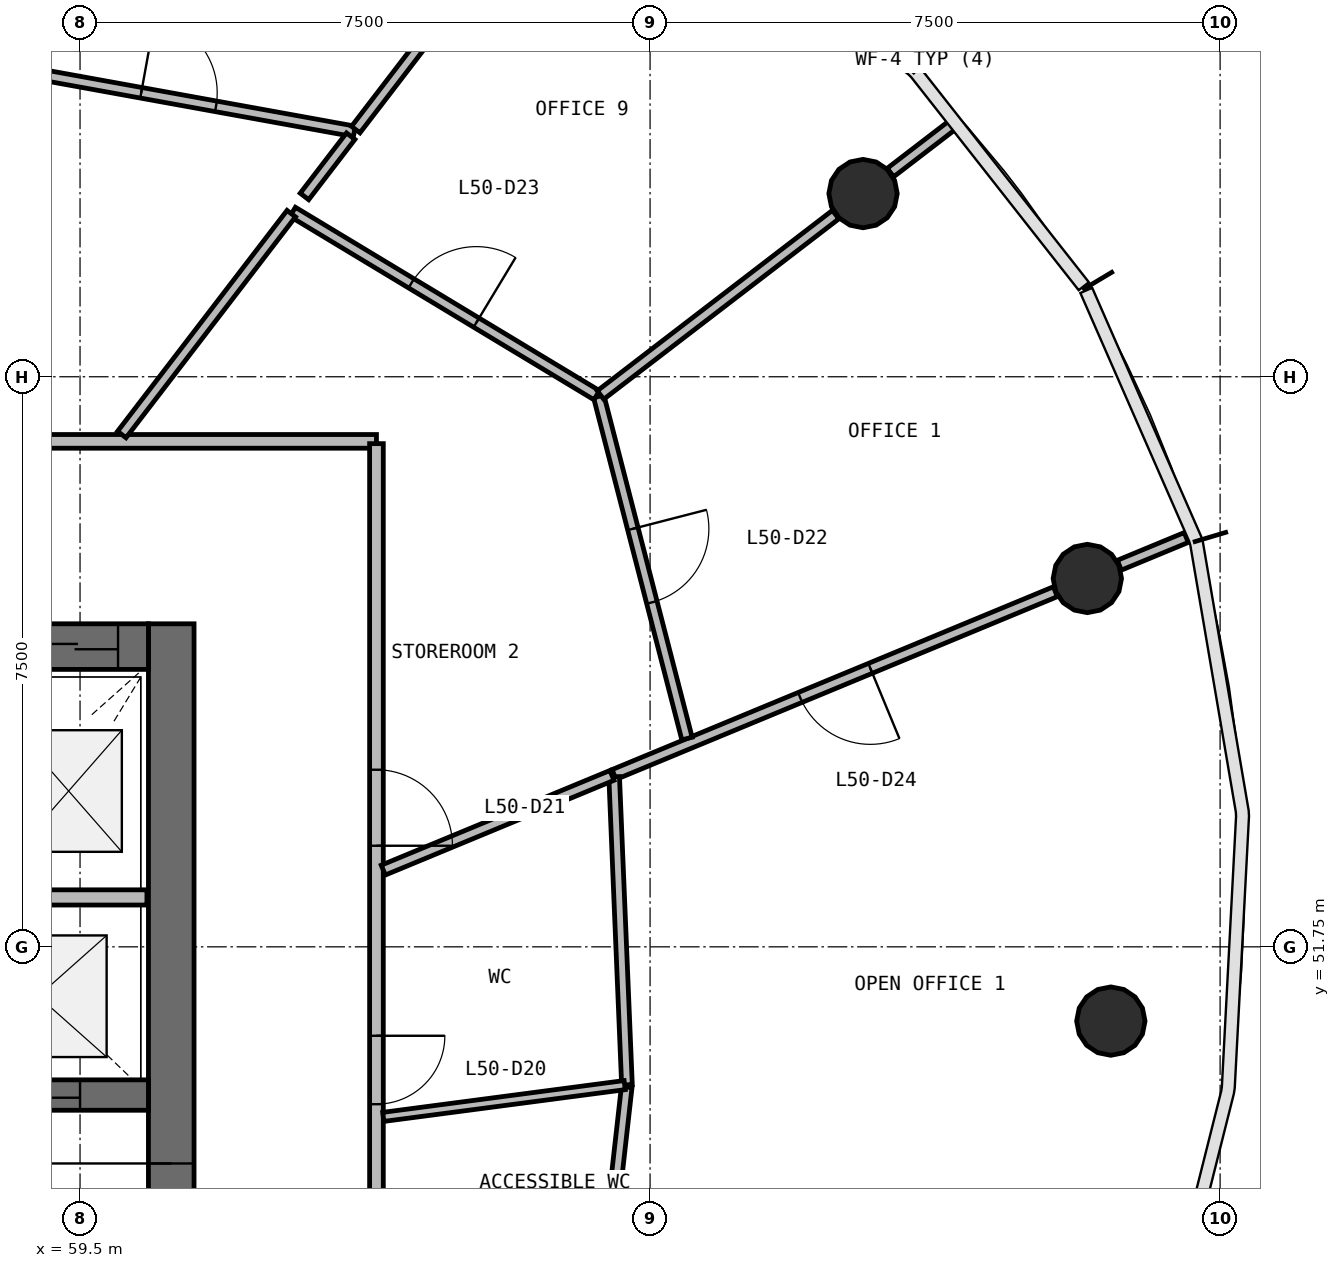
"""IFC4 building model, lengths in metres.
Left out: names, types, materials, properties, quantities, classifications, styles, units other than length and angle.
Written with IfcOpenShell. Run it as: python <this file> out.ifc"""

import sys

from ifc_helpers import new_model, si_unit, direction, frame, frame_2d, origin, origin_2d, place, context, subcontext, project, spatial, rectangle, circle, extrude, source, transform, mapped, element, fill, save


model = new_model("IFC4")
c1 = context("Model", 3, precision=1e-05, world=origin(), true_north=direction((0.0, 1.0)))
c2 = subcontext(c1, "Body", "Model", "MODEL_VIEW")
j1 = project(units=[si_unit("LENGTHUNIT", "METRE"), si_unit("PLANEANGLEUNIT", "RADIAN")], contexts=[c1])
p1 = place(None, origin())
s1 = spatial("IfcSite", under=j1, at=p1, CompositionType="ELEMENT")
p2 = place(p1, origin())
s2 = spatial("IfcBuilding", under=s1, at=p2, CompositionType="ELEMENT")
p3 = place(p2, frame((0.0, 0.0, 207.2)))
s3 = spatial("IfcBuildingStorey", under=s2, at=p3, CompositionType="ELEMENT", Elevation=207.2)
p4 = place(p3, frame((60.7, 40.0, 0.0), z_axis=(0.0, 0.0, 1.0), x_axis=(0.0, 1.0, 0.0)))
e1 = element("IfcWall", 1, at=p4, inside=s3, PredefinedType="SHEAR", context=c2, shape_type="SweptSolid", body=[
    extrude(rectangle(XDim=16.0, YDim=0.6, at=frame_2d((8.0, 0.0))), origin(), (0.0, 0.0, 1.0), 3.9),
])
p5 = place(p4, frame((7.1, 0.0, 0.0)))
e2 = element("IfcOpeningElement", 2, at=p5, cuts=e1, PredefinedType="OPENING", context=c2, shape_type="SweptSolid", body=[
    extrude(rectangle(XDim=1.8, YDim=2.1, at=frame_2d((0.9, 1.05))), frame((0.0, 0.31, 0.0), z_axis=(0.0, -1.0, 0.0), x_axis=(1.0, 0.0, 0.0)), (0.0, 0.0, 1.0), 0.62),
])
p6 = place(p3, frame((60.4, 55.7, 0.0), z_axis=(0.0, 0.0, 1.0), x_axis=(-1.0, 0.0, 0.0)))
e3 = element("IfcWall", 3, at=p6, inside=s3, PredefinedType="SHEAR", context=c2, shape_type="SweptSolid", body=[
    extrude(rectangle(XDim=16.8, YDim=0.6, at=frame_2d((8.4, 0.0))), origin(), (0.0, 0.0, 1.0), 3.9),
])
p7 = place(p6, frame((0.4, 0.0, 0.0)))
e4 = element("IfcOpeningElement", 4, at=p7, cuts=e3, PredefinedType="OPENING", context=c2, shape_type="SweptSolid", body=[
    extrude(rectangle(XDim=1.1, YDim=2.1, at=frame_2d((0.55, 1.05))), frame((0.0, 0.31, 0.0), z_axis=(0.0, -1.0, 0.0), x_axis=(1.0, 0.0, 0.0)), (0.0, 0.0, 1.0), 0.62),
])
p8 = place(p6, frame((10.3, 0.0, 0.0)))
e5 = element("IfcOpeningElement", 5, at=p8, cuts=e3, PredefinedType="OPENING", context=c2, shape_type="SweptSolid", body=[
    extrude(rectangle(XDim=1.2, YDim=2.1, at=frame_2d((0.6, 1.05))), frame((0.0, 0.31, 0.0), z_axis=(0.0, -1.0, 0.0), x_axis=(1.0, 0.0, 0.0)), (0.0, 0.0, 1.0), 0.62),
])
p9 = place(p6, frame((7.25, 0.0, 0.0)))
e6 = element("IfcOpeningElement", 6, at=p9, cuts=e3, PredefinedType="OPENING", context=c2, shape_type="SweptSolid", body=[
    extrude(rectangle(XDim=1.1, YDim=2.1, at=frame_2d((0.55, 1.05))), frame((0.0, 0.31, 0.0), z_axis=(0.0, -1.0, 0.0), x_axis=(1.0, 0.0, 0.0)), (0.0, 0.0, 1.0), 0.62),
])
p10 = place(p3, frame((43.6, 49.8, 0.0), z_axis=(0.0, 0.0, 1.0), x_axis=(1.0, 0.0, 0.0)))
e7 = element("IfcWall", 7, at=p10, inside=s3, PredefinedType="SHEAR", context=c2, shape_type="SweptSolid", body=[
    extrude(rectangle(XDim=16.8, YDim=0.4, at=frame_2d((8.4, 0.0))), origin(), (0.0, 0.0, 1.0), 3.9),
])
p11 = place(p10, frame((9.8, 0.0, 0.0)))
e8 = element("IfcOpeningElement", 8, at=p11, cuts=e7, PredefinedType="OPENING", context=c2, shape_type="SweptSolid", body=[
    extrude(rectangle(XDim=1.1, YDim=2.1, at=frame_2d((0.55, 1.05))), frame((0.0, 0.21, 0.0), z_axis=(0.0, -1.0, 0.0), x_axis=(1.0, 0.0, 0.0)), (0.0, 0.0, 1.0), 0.42),
])
p12 = place(p10, frame((12.3, 0.0, 0.0)))
e9 = element("IfcOpeningElement", 9, at=p12, cuts=e7, PredefinedType="OPENING", context=c2, shape_type="SweptSolid", body=[
    extrude(rectangle(XDim=1.1, YDim=2.1, at=frame_2d((0.55, 1.05))), frame((0.0, 0.21, 0.0), z_axis=(0.0, -1.0, 0.0), x_axis=(1.0, 0.0, 0.0)), (0.0, 0.0, 1.0), 0.42),
])
p13 = place(p10, frame((14.8, 0.0, 0.0)))
e10 = element("IfcOpeningElement", 10, at=p13, cuts=e7, PredefinedType="OPENING", context=c2, shape_type="SweptSolid", body=[
    extrude(rectangle(XDim=1.1, YDim=2.1, at=frame_2d((0.55, 1.05))), frame((0.0, 0.21, 0.0), z_axis=(0.0, -1.0, 0.0), x_axis=(1.0, 0.0, 0.0)), (0.0, 0.0, 1.0), 0.42),
])
p14 = place(p10, frame((3.45, 0.0, 0.0)))
e11 = element("IfcOpeningElement", 11, at=p14, cuts=e7, PredefinedType="OPENING", context=c2, shape_type="SweptSolid", body=[
    extrude(rectangle(XDim=0.9, YDim=2.1, at=frame_2d((0.45, 1.05))), frame((0.0, 0.21, 0.0), z_axis=(0.0, -1.0, 0.0), x_axis=(1.0, 0.0, 0.0)), (0.0, 0.0, 1.0), 0.42),
])
p15 = place(p10, frame((7.85, 0.0, 0.0)))
e12 = element("IfcOpeningElement", 12, at=p15, cuts=e7, PredefinedType="OPENING", context=c2, shape_type="SweptSolid", body=[
    extrude(rectangle(XDim=0.9, YDim=2.1, at=frame_2d((0.45, 1.05))), frame((0.0, 0.21, 0.0), z_axis=(0.0, -1.0, 0.0), x_axis=(1.0, 0.0, 0.0)), (0.0, 0.0, 1.0), 0.42),
])
m1 = source(origin(), c2, "Body", "SweptSolid", [
    extrude(circle(Radius=0.45, at=origin_2d()), origin(), (0.0, 0.0, 1.0), 3.9),
])
for number, where, z_axis, x_axis in (
    (13, (73.062, 50.773, 0.0), (0.0, 0.0, 1.0), (1.0, 0.0, 0.0)),
    (14, (72.753, 56.596, 0.0), (0.0, 0.0, 1.0), (1.0, 0.0, 0.0)),
    (15, (69.802, 61.66, 0.0), (0.0, 0.0, 1.0), (1.0, 0.0, 0.0)),
):
    element("IfcColumn", number, at=place(p3, frame(where, z_axis=z_axis, x_axis=x_axis)), inside=s3, PredefinedType="COLUMN", context=c2, shape_type="MappedRepresentation", body=[
        mapped(m1, transform((0.0, 0.0, 0.0), scale=1.0)),
    ])
p16 = place(p3, frame((60.38, 52.4, 0.0), z_axis=(0.0, 0.0, 1.0), x_axis=(-1.0, 0.0, 0.0)))
e16 = element("IfcWall", 16, at=p16, inside=s3, PredefinedType="SOLIDWALL", context=c2, shape_type="SweptSolid", body=[
    extrude(rectangle(XDim=1.85, YDim=0.2, at=frame_2d((0.925, 0.0))), origin(), (0.0, 0.0, 1.0), 3.58),
])
p17 = place(p3, frame((40.6, 58.4, 0.0), z_axis=(0.0, 0.0, 1.0), x_axis=(1.0, 0.0, 0.0)))
e17 = element("IfcWall", 17, at=p17, inside=s3, PredefinedType="PARTITIONING", context=c2, shape_type="SweptSolid", body=[
    extrude(rectangle(XDim=22.8, YDim=0.18, at=frame_2d((11.4, 0.0))), origin(), (0.0, 0.0, 1.0), 2.88),
])
p18 = place(p17, frame((12.95, 0.0, 0.0)))
e18 = element("IfcOpeningElement", 18, at=p18, cuts=e17, PredefinedType="OPENING", context=c2, shape_type="SweptSolid", body=[
    extrude(rectangle(XDim=1.0, YDim=2.1, at=frame_2d((0.5, 1.05))), frame((0.0, 0.1, 0.0), z_axis=(0.0, -1.0, 0.0), x_axis=(1.0, 0.0, 0.0)), (0.0, 0.0, 1.0), 0.2),
])
p19 = place(p17, frame((10.95, 0.0, 0.0)))
e19 = element("IfcOpeningElement", 19, at=p19, cuts=e17, PredefinedType="OPENING", context=c2, shape_type="SweptSolid", body=[
    extrude(rectangle(XDim=1.0, YDim=2.1, at=frame_2d((0.5, 1.05))), frame((0.0, 0.1, 0.0), z_axis=(0.0, -1.0, 0.0), x_axis=(1.0, 0.0, 0.0)), (0.0, 0.0, 1.0), 0.2),
])
p20 = place(p3, frame((63.4, 58.37, 0.0), z_axis=(0.0, 0.0, 1.0), x_axis=(0.0, -1.0, 0.0)))
e20 = element("IfcWall", 20, at=p20, inside=s3, PredefinedType="PARTITIONING", context=c2, shape_type="SweptSolid", body=[
    extrude(rectangle(XDim=20.74, YDim=0.18, at=frame_2d((10.37, 0.0))), origin(), (0.0, 0.0, 1.0), 2.88),
])
p21 = place(p20, frame((9.99, 0.0, 0.0)))
e21 = element("IfcOpeningElement", 21, at=p21, cuts=e20, PredefinedType="OPENING", context=c2, shape_type="SweptSolid", body=[
    extrude(rectangle(XDim=0.9, YDim=2.1, at=frame_2d((0.45, 1.05))), frame((0.0, 0.1, 0.0), z_axis=(0.0, -1.0, 0.0), x_axis=(1.0, 0.0, 0.0)), (0.0, 0.0, 1.0), 0.2),
])
p22 = place(p20, frame((7.79, 0.0, 0.0)))
e22 = element("IfcOpeningElement", 22, at=p22, cuts=e20, PredefinedType="OPENING", context=c2, shape_type="SweptSolid", body=[
    extrude(rectangle(XDim=0.9, YDim=2.1, at=frame_2d((0.45, 1.05))), frame((0.0, 0.1, 0.0), z_axis=(0.0, -1.0, 0.0), x_axis=(1.0, 0.0, 0.0)), (0.0, 0.0, 1.0), 0.2),
])
p23 = place(p20, frame((4.29, 0.0, 0.0)))
e23 = element("IfcOpeningElement", 23, at=p23, cuts=e20, PredefinedType="OPENING", context=c2, shape_type="SweptSolid", body=[
    extrude(rectangle(XDim=1.0, YDim=2.1, at=frame_2d((0.5, 1.05))), frame((0.0, 0.1, 0.0), z_axis=(0.0, -1.0, 0.0), x_axis=(1.0, 0.0, 0.0)), (0.0, 0.0, 1.0), 0.2),
])
p24 = place(p20, frame((15.49, 0.0, 0.0)))
e24 = element("IfcOpeningElement", 24, at=p24, cuts=e20, PredefinedType="OPENING", context=c2, shape_type="SweptSolid", body=[
    extrude(rectangle(XDim=1.0, YDim=2.1, at=frame_2d((0.5, 1.05))), frame((0.0, 0.1, 0.0), z_axis=(0.0, -1.0, 0.0), x_axis=(1.0, 0.0, 0.0)), (0.0, 0.0, 1.0), 0.2),
])
p25 = place(p20, frame((12.09, 0.0, 0.0)))
e25 = element("IfcOpeningElement", 25, at=p25, cuts=e20, PredefinedType="OPENING", context=c2, shape_type="SweptSolid", body=[
    extrude(rectangle(XDim=1.0, YDim=2.1, at=frame_2d((0.5, 1.05))), frame((0.0, 0.1, 0.0), z_axis=(0.0, -1.0, 0.0), x_axis=(1.0, 0.0, 0.0)), (0.0, 0.0, 1.0), 0.2),
])
p26 = place(p3, frame((72.333, 56.422, 0.0), z_axis=(0.0, 0.0, 1.0), x_axis=(-0.92388853292, -0.382661702733, 0.0)))
e26 = element("IfcWall", 26, at=p26, inside=s3, PredefinedType="PARTITIONING", context=c2, shape_type="SweptSolid", body=[
    extrude(rectangle(XDim=6.285, YDim=0.14, at=frame_2d((3.143, 0.0))), origin(), (0.0, 0.0, 1.0), 2.88),
])
p27 = place(p26, frame((2.635, 0.0, 0.0)))
e27 = element("IfcOpeningElement", 27, at=p27, cuts=e26, PredefinedType="OPENING", context=c2, shape_type="SweptSolid", body=[
    extrude(rectangle(XDim=1.0, YDim=2.1, at=frame_2d((0.5, 1.05))), frame((0.0, 0.08, 0.0), z_axis=(0.0, -1.0, 0.0), x_axis=(1.0, 0.0, 0.0)), (0.0, 0.0, 1.0), 0.16),
])
p28 = place(p3, frame((58.354, 63.339, 0.0), z_axis=(0.0, 0.0, 1.0), x_axis=(0.983980456021, -0.178276364581, 0.0)))
e28 = element("IfcWall", 28, at=p28, inside=s3, PredefinedType="PARTITIONING", context=c2, shape_type="SweptSolid", body=[
    extrude(rectangle(XDim=4.833, YDim=0.14, at=frame_2d((2.417, 0.0))), origin(), (0.0, 0.0, 1.0), 2.88),
])
p29 = place(p28, frame((1.983, 0.0, 0.0)))
e29 = element("IfcOpeningElement", 29, at=p29, cuts=e28, PredefinedType="OPENING", context=c2, shape_type="SweptSolid", body=[
    extrude(rectangle(XDim=1.0, YDim=2.1, at=frame_2d((0.5, 1.05))), frame((0.0, 0.08, 0.0), z_axis=(0.0, -1.0, 0.0), x_axis=(1.0, 0.0, 0.0)), (0.0, 0.0, 1.0), 0.16),
])
p30 = place(p3, frame((66.324, 58.991, 0.0), z_axis=(0.0, 0.0, 1.0), x_axis=(0.249819251726, -0.968292487561, 0.0)))
e30 = element("IfcWall", 30, at=p30, inside=s3, PredefinedType="PARTITIONING", context=c2, shape_type="SweptSolid", body=[
    extrude(rectangle(XDim=4.649, YDim=0.14, at=frame_2d((2.324, 0.0))), origin(), (0.0, 0.0, 1.0), 2.88),
])
p31 = place(p30, frame((1.799, 0.0, 0.0)))
e31 = element("IfcOpeningElement", 31, at=p31, cuts=e30, PredefinedType="OPENING", context=c2, shape_type="SweptSolid", body=[
    extrude(rectangle(XDim=1.0, YDim=2.1, at=frame_2d((0.5, 1.05))), frame((0.0, 0.08, 0.0), z_axis=(0.0, -1.0, 0.0), x_axis=(1.0, 0.0, 0.0)), (0.0, 0.0, 1.0), 0.16),
])
p32 = place(p3, frame((62.298, 61.42, 0.0), z_axis=(0.0, 0.0, 1.0), x_axis=(0.856310382511, -0.516461546298, 0.0)))
e32 = element("IfcWall", 32, at=p32, inside=s3, PredefinedType="PARTITIONING", context=c2, shape_type="SweptSolid", body=[
    extrude(rectangle(XDim=4.672, YDim=0.14, at=frame_2d((2.336, 0.0))), origin(), (0.0, 0.0, 1.0), 2.88),
])
p33 = place(p32, frame((1.823, 0.0, 0.0)))
e33 = element("IfcOpeningElement", 33, at=p33, cuts=e32, PredefinedType="OPENING", context=c2, shape_type="SweptSolid", body=[
    extrude(rectangle(XDim=1.0, YDim=2.1, at=frame_2d((0.5, 1.05))), frame((0.0, 0.08, 0.0), z_axis=(0.0, -1.0, 0.0), x_axis=(1.0, 0.0, 0.0)), (0.0, 0.0, 1.0), 0.16),
])
p34 = place(p3, frame((66.696, 49.935, 0.0), z_axis=(0.0, 0.0, 1.0), x_axis=(-0.041535399008, 0.999137032959, 0.0)))
e34 = element("IfcWall", 34, at=p34, inside=s3, PredefinedType="PARTITIONING", context=c2, shape_type="SweptSolid", body=[
    extrude(rectangle(XDim=4.056, YDim=0.14, at=frame_2d((2.028, 0.0))), origin(), (0.0, 0.0, 1.0), 2.88),
])
p35 = place(p3, frame((66.348, 59.01, 0.0), z_axis=(0.0, 0.0, 1.0), x_axis=(0.793347300472, 0.608769300173, 0.0)))
e35 = element("IfcWall", 35, at=p35, inside=s3, PredefinedType="PARTITIONING", context=c2, shape_type="SweptSolid", body=[
    extrude(rectangle(XDim=3.899, YDim=0.14, at=frame_2d((1.95, 0.0))), origin(), (0.0, 0.0, 1.0), 2.88),
])
p36 = place(p3, frame((66.271, 46.152, 0.0), z_axis=(0.0, 0.0, 1.0), x_axis=(0.111758070994, 0.993735444456, 0.0)))
e36 = element("IfcWall", 36, at=p36, inside=s3, PredefinedType="PARTITIONING", context=c2, shape_type="SweptSolid", body=[
    extrude(rectangle(XDim=3.777, YDim=0.14, at=frame_2d((1.889, 0.0))), origin(), (0.0, 0.0, 1.0), 2.88),
])
p37 = place(p3, frame((60.049, 58.49, 0.0), z_axis=(0.0, 0.0, 1.0), x_axis=(0.60875050296, 0.793361724024, 0.0)))
e37 = element("IfcWall", 37, at=p37, inside=s3, PredefinedType="PARTITIONING", context=c2, shape_type="SweptSolid", body=[
    extrude(rectangle(XDim=3.663, YDim=0.14, at=frame_2d((1.832, 0.0))), origin(), (0.0, 0.0, 1.0), 2.88),
])
p38 = place(p3, frame((62.453, 61.622, 0.0), z_axis=(0.0, 0.0, 1.0), x_axis=(0.608872401912, 0.793268175455, 0.0)))
e38 = element("IfcWall", 38, at=p38, inside=s3, PredefinedType="PARTITIONING", context=c2, shape_type="SweptSolid", body=[
    extrude(rectangle(XDim=1.0, YDim=0.14, at=frame_2d((0.5, 0.0))), origin(), (0.0, 0.0, 1.0), 2.88),
])
p39 = place(p3, frame((63.127, 62.501, 0.0), z_axis=(0.0, 0.0, 1.0), x_axis=(0.608750837214, 0.793361467549, 0.0)))
e39 = element("IfcWall", 39, at=p39, inside=s3, PredefinedType="PARTITIONING", context=c2, shape_type="SweptSolid", body=[
    extrude(rectangle(XDim=2.472, YDim=0.14, at=frame_2d((1.236, 0.0))), origin(), (0.0, 0.0, 1.0), 2.88),
])
p40 = place(p3, frame((63.49, 52.759, 0.0), z_axis=(0.0, 0.0, 1.0), x_axis=(0.923862401464, 0.382724787753, 0.0)))
e40 = element("IfcWall", 40, at=p40, inside=s3, PredefinedType="PARTITIONING", context=c2, shape_type="SweptSolid", body=[
    extrude(rectangle(XDim=3.257, YDim=0.14, at=frame_2d((1.628, 0.0))), origin(), (0.0, 0.0, 1.0), 2.88),
])
p41 = place(p3, frame((58.381, 63.406, 0.0), z_axis=(0.0, 0.0, 1.0), x_axis=(0.382733405642, 0.923858831319, 0.0)))
e41 = element("IfcWall", 41, at=p41, inside=s3, PredefinedType="PARTITIONING", context=c2, shape_type="SweptSolid", body=[
    extrude(rectangle(XDim=2.58, YDim=0.14, at=frame_2d((1.29, 0.0))), origin(), (0.0, 0.0, 1.0), 2.88),
])
p42 = place(p3, frame((70.163, 61.937, 0.0), z_axis=(0.0, 0.0, 1.0), x_axis=(0.793403619358, 0.608695898449, 0.0)))
e42 = element("IfcWall", 42, at=p42, inside=s3, PredefinedType="PARTITIONING", context=c2, shape_type="SweptSolid", body=[
    extrude(rectangle(XDim=1.047, YDim=0.14, at=frame_2d((0.523, 0.0))), origin(), (0.0, 0.0, 1.0), 2.88),
])
p43 = place(p3, frame((73.174, 56.77, 0.0), z_axis=(0.0, 0.0, 1.0), x_axis=(0.923779659408, 0.38292445843, 0.0)))
e43 = element("IfcWall", 43, at=p43, inside=s3, PredefinedType="PARTITIONING", context=c2, shape_type="SweptSolid", body=[
    extrude(rectangle(XDim=0.954, YDim=0.14, at=frame_2d((0.477, 0.0))), origin(), (0.0, 0.0, 1.0), 2.88),
])
p44 = place(p3, frame((63.49, 49.513, 0.0), z_axis=(0.0, 0.0, 1.0), x_axis=(0.991442878973, 0.130541249168, 0.0)))
e44 = element("IfcWall", 44, at=p44, inside=s3, PredefinedType="PARTITIONING", context=c2, shape_type="SweptSolid", body=[
    extrude(rectangle(XDim=3.204, YDim=0.12, at=frame_2d((1.602, 0.0))), origin(), (0.0, 0.0, 1.0), 2.88),
])
m2 = source(origin(), c2, "Body", "SweptSolid", [
    extrude(rectangle(XDim=1.8, YDim=2.1, at=frame_2d((0.9, 1.05))), frame((0.0, 0.025, 0.0), z_axis=(0.0, -1.0, 0.0), x_axis=(1.0, 0.0, 0.0)), (0.0, 0.0, 1.0), 0.05),
])
p45 = place(p5, origin())
e45 = element("IfcDoor", 45, at=p45, inside=s3, OperationType="SINGLE_SWING_RIGHT", PredefinedType="DOOR", context=c2, shape_type="MappedRepresentation", body=[
    mapped(m2, transform((0.0, 0.0, 0.0), scale=1.0)),
])
fill(e2, e45)
m3 = source(origin(), c2, "Body", "SweptSolid", [
    extrude(rectangle(XDim=1.1, YDim=2.1, at=frame_2d((0.55, 1.05))), frame((0.0, 0.025, 0.0), z_axis=(0.0, -1.0, 0.0), x_axis=(1.0, 0.0, 0.0)), (0.0, 0.0, 1.0), 0.05),
])
p46 = place(p13, origin())
e46 = element("IfcDoor", 46, at=p46, inside=s3, OperationType="DOUBLE_DOOR_SLIDING", PredefinedType="USERDEFINED", context=c2, shape_type="MappedRepresentation", body=[
    mapped(m3, transform((0.0, 0.0, 0.0), scale=1.0)),
])
fill(e10, e46)
p47 = place(p7, origin())
e47 = element("IfcDoor", 47, at=p47, inside=s3, OperationType="DOUBLE_DOOR_SLIDING", PredefinedType="USERDEFINED", context=c2, shape_type="MappedRepresentation", body=[
    mapped(m3, transform((0.0, 0.0, 0.0), scale=1.0)),
])
fill(e4, e47)
m4 = source(origin(), c2, "Body", "SweptSolid", [
    extrude(rectangle(XDim=0.9, YDim=2.1, at=frame_2d((0.45, 1.05))), frame((0.0, 0.025, 0.0), z_axis=(0.0, -1.0, 0.0), x_axis=(1.0, 0.0, 0.0)), (0.0, 0.0, 1.0), 0.05),
])
p48 = place(p22, origin())
e48 = element("IfcDoor", 48, at=p48, inside=s3, OperationType="SINGLE_SWING_LEFT", PredefinedType="DOOR", context=c2, shape_type="MappedRepresentation", body=[
    mapped(m4, transform((0.0, 0.0, 0.0), scale=1.0)),
])
fill(e22, e48)
m5 = source(origin(), c2, "Body", "SweptSolid", [
    extrude(rectangle(XDim=1.0, YDim=2.1, at=frame_2d((0.5, 1.05))), frame((0.0, 0.025, 0.0), z_axis=(0.0, -1.0, 0.0), x_axis=(1.0, 0.0, 0.0)), (0.0, 0.0, 1.0), 0.05),
])
p49 = place(p23, origin())
e49 = element("IfcDoor", 49, at=p49, inside=s3, OperationType="SINGLE_SWING_RIGHT", PredefinedType="DOOR", context=c2, shape_type="MappedRepresentation", body=[
    mapped(m5, transform((0.0, 0.0, 0.0), scale=1.0)),
])
fill(e23, e49)
p50 = place(p31, origin())
e50 = element("IfcDoor", 50, at=p50, inside=s3, OperationType="SINGLE_SWING_LEFT", PredefinedType="DOOR", context=c2, shape_type="MappedRepresentation", body=[
    mapped(m5, transform((0.0, 0.0, 0.0), scale=1.0)),
])
fill(e31, e50)
p51 = place(p33, origin())
e51 = element("IfcDoor", 51, at=p51, inside=s3, OperationType="SINGLE_SWING_RIGHT", PredefinedType="DOOR", context=c2, shape_type="MappedRepresentation", body=[
    mapped(m5, transform((0.0, 0.0, 0.0), scale=1.0)),
])
fill(e33, e51)
p52 = place(p27, origin())
e52 = element("IfcDoor", 52, at=p52, inside=s3, OperationType="SINGLE_SWING_LEFT", PredefinedType="DOOR", context=c2, shape_type="MappedRepresentation", body=[
    mapped(m5, transform((0.0, 0.0, 0.0), scale=1.0)),
])
fill(e27, e52)
p53 = place(p29, origin())
e53 = element("IfcDoor", 53, at=p53, inside=s3, OperationType="SINGLE_SWING_LEFT", PredefinedType="DOOR", context=c2, shape_type="MappedRepresentation", body=[
    mapped(m5, transform((0.0, 0.0, 0.0), scale=1.0)),
])
fill(e29, e53)
save(model, sys.argv[1])
